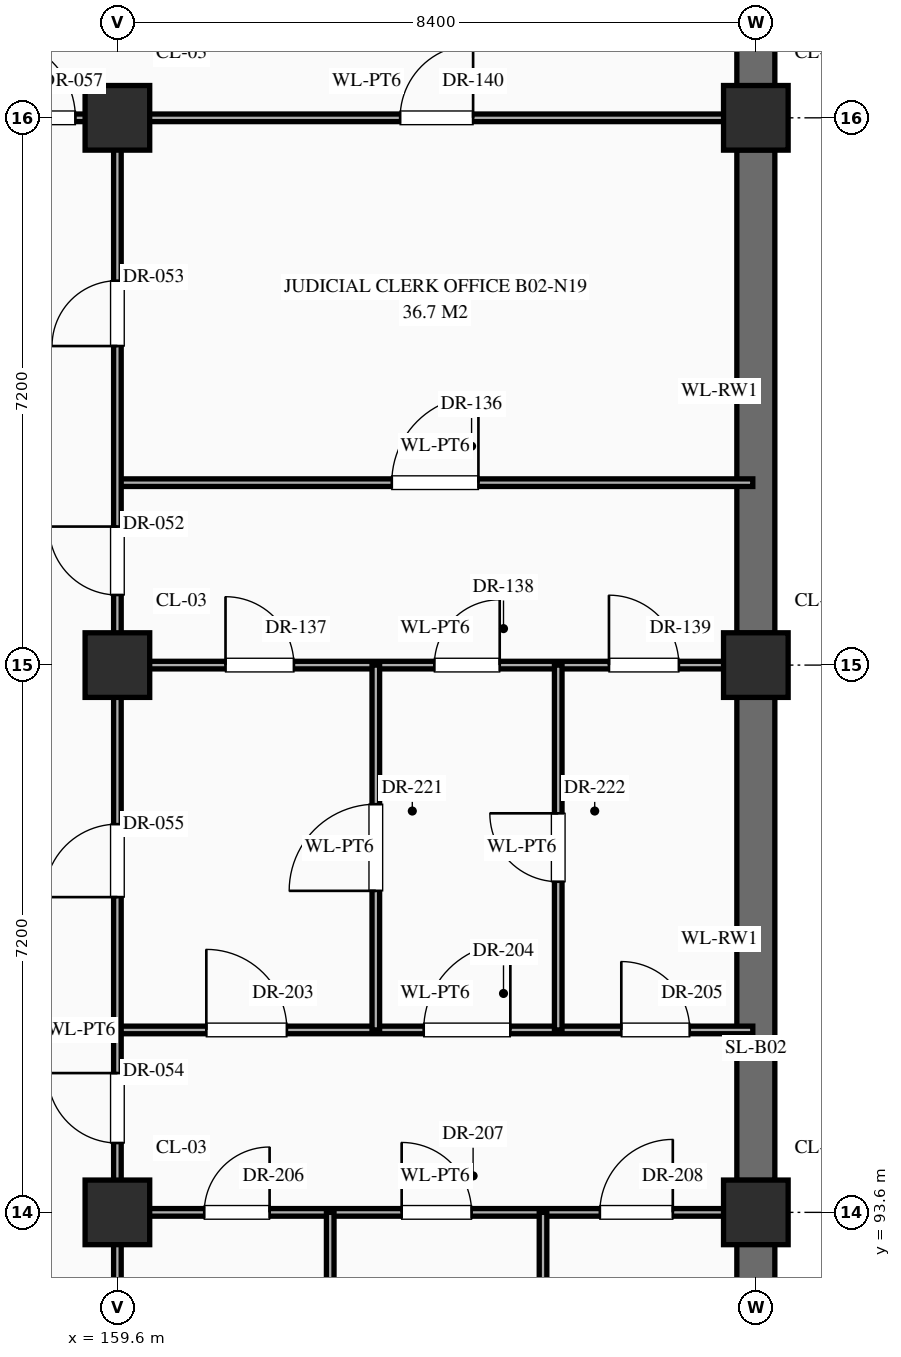
"""IFC4 building model, lengths in metres.
Left out: names, types, materials, properties, quantities, classifications, styles, units other than length and angle.
Written with IfcOpenShell. Run it as: python <this file> out.ifc"""

import sys

from ifc_helpers import new_model, si_unit, direction, frame, frame_2d, origin, origin_2d, place, context, subcontext, project, spatial, rectangle, extrude, element, fill, save


model = new_model("IFC4")
c1 = context("Model", 3, precision=1e-05, world=origin(), true_north=direction((0.0, 1.0)))
c2 = subcontext(c1, "Body", "Model", "MODEL_VIEW")
j1 = project(units=[si_unit("LENGTHUNIT", "METRE"), si_unit("PLANEANGLEUNIT", "RADIAN")], contexts=[c1])
p1 = place(None, origin())
s1 = spatial("IfcSite", under=j1, at=p1, CompositionType="ELEMENT")
p2 = place(p1, origin())
s2 = spatial("IfcBuilding", under=s1, at=p2, CompositionType="ELEMENT")
p3 = place(p2, frame((0.0, 0.0, -10.2)))
s3 = spatial("IfcBuildingStorey", under=s2, at=p3, CompositionType="ELEMENT", Elevation=-10.2)
for number, where, z_axis, x_axis in (
    (1, (159.6, 93.6, 0.0), (0.0, 0.0, 1.0), (1.0, 0.0, 0.0)),
    (2, (159.6, 100.8, 0.0), (0.0, 0.0, 1.0), (1.0, 0.0, 0.0)),
    (3, (159.6, 108.0, 0.0), (0.0, 0.0, 1.0), (1.0, 0.0, 0.0)),
    (4, (168.0, 93.6, 0.0), (0.0, 0.0, 1.0), (1.0, 0.0, 0.0)),
    (5, (168.0, 100.8, 0.0), (0.0, 0.0, 1.0), (1.0, 0.0, 0.0)),
    (6, (168.0, 108.0, 0.0), (0.0, 0.0, 1.0), (1.0, 0.0, 0.0)),
):
    element("IfcColumn", number, at=place(p3, frame(where, z_axis=z_axis, x_axis=x_axis)), inside=s3, PredefinedType="COLUMN", context=c2, shape_type="SweptSolid", body=[
        extrude(rectangle(XDim=0.85, YDim=0.85, at=origin_2d()), origin(), (0.0, 0.0, 1.0), 4.8),
    ])
for number, where, z_axis, x_axis in (
    (7, (168.0, 86.82, 0.0), (0.0, 0.0, 1.0), (0.0, 1.0, 0.0)),
    (8, (168.0, 94.02, 0.0), (0.0, 0.0, 1.0), (0.0, 1.0, 0.0)),
):
    element("IfcWall", number, at=place(p3, frame(where, z_axis=z_axis, x_axis=x_axis)), inside=s3, PredefinedType="USERDEFINED", context=c2, shape_type="SweptSolid", body=[
        extrude(rectangle(XDim=6.36, YDim=0.5, at=frame_2d((3.18, 0.0))), origin(), (0.0, 0.0, 1.0), 4.48),
    ])
for number, where, z_axis, x_axis in (
    (9, (168.0, 101.22, 0.0), (0.0, 0.0, 1.0), (0.0, 1.0, 0.0)),
    (10, (168.0, 108.42, 0.0), (0.0, 0.0, 1.0), (0.0, 1.0, 0.0)),
):
    element("IfcWall", number, at=place(p3, frame(where, z_axis=z_axis, x_axis=x_axis)), inside=s3, PredefinedType="USERDEFINED", context=c2, shape_type="SweptSolid", body=[
        extrude(rectangle(XDim=6.36, YDim=0.5, at=frame_2d((3.18, 0.0))), origin(), (0.0, 0.0, 1.0), 4.48),
    ])
p4 = place(p3, frame((159.6, 93.6, 0.0), z_axis=(0.0, 0.0, 1.0), x_axis=(1.0, 0.0, 0.0)))
e11 = element("IfcWall", 11, at=p4, inside=s3, PredefinedType="STANDARD", context=c2, shape_type="SweptSolid", body=[
    extrude(rectangle(XDim=8.36, YDim=0.1, at=frame_2d((4.18, 0.0))), origin(), (0.0, 0.0, 1.0), 3.63),
])
p5 = place(p4, frame((1.143, 0.0, 0.0)))
e12 = element("IfcOpeningElement", 12, at=p5, cuts=e11, PredefinedType="OPENING", context=c2, shape_type="SweptSolid", body=[
    extrude(rectangle(XDim=0.86, YDim=2.1, at=frame_2d((0.43, 1.05))), frame((0.0, 0.062, 0.0), z_axis=(0.0, -1.0, 0.0), x_axis=(1.0, 0.0, 0.0)), (0.0, 0.0, 1.0), 0.124),
])
p6 = place(p4, frame((3.74, 0.0, 0.0)))
e13 = element("IfcOpeningElement", 13, at=p6, cuts=e11, PredefinedType="OPENING", context=c2, shape_type="SweptSolid", body=[
    extrude(rectangle(XDim=0.92, YDim=2.15, at=frame_2d((0.46, 1.075))), frame((0.0, 0.062, 0.0), z_axis=(0.0, -1.0, 0.0), x_axis=(1.0, 0.0, 0.0)), (0.0, 0.0, 1.0), 0.124),
])
p7 = place(p4, frame((6.347, 0.0, 0.0)))
e14 = element("IfcOpeningElement", 14, at=p7, cuts=e11, PredefinedType="OPENING", context=c2, shape_type="SweptSolid", body=[
    extrude(rectangle(XDim=0.96, YDim=2.2, at=frame_2d((0.48, 1.1))), frame((0.0, 0.062, 0.0), z_axis=(0.0, -1.0, 0.0), x_axis=(1.0, 0.0, 0.0)), (0.0, 0.0, 1.0), 0.124),
])
p8 = place(p3, frame((159.6, 96.0, 0.0), z_axis=(0.0, 0.0, 1.0), x_axis=(1.0, 0.0, 0.0)))
e15 = element("IfcWall", 15, at=p8, inside=s3, PredefinedType="STANDARD", context=c2, shape_type="SweptSolid", body=[
    extrude(rectangle(XDim=8.36, YDim=0.1, at=frame_2d((4.18, 0.0))), origin(), (0.0, 0.0, 1.0), 4.48),
])
p9 = place(p8, frame((1.17, 0.0, 0.0)))
e16 = element("IfcOpeningElement", 16, at=p9, cuts=e15, PredefinedType="OPENING", context=c2, shape_type="SweptSolid", body=[
    extrude(rectangle(XDim=1.06, YDim=2.4, at=frame_2d((0.53, 1.2))), frame((0.0, 0.062, 0.0), z_axis=(0.0, -1.0, 0.0), x_axis=(1.0, 0.0, 0.0)), (0.0, 0.0, 1.0), 0.124),
])
p10 = place(p8, frame((4.03, 0.0, 0.0)))
e17 = element("IfcOpeningElement", 17, at=p10, cuts=e15, PredefinedType="OPENING", context=c2, shape_type="SweptSolid", body=[
    extrude(rectangle(XDim=1.14, YDim=2.4, at=frame_2d((0.57, 1.2))), frame((0.0, 0.062, 0.0), z_axis=(0.0, -1.0, 0.0), x_axis=(1.0, 0.0, 0.0)), (0.0, 0.0, 1.0), 0.124),
])
p11 = place(p8, frame((6.63, 0.0, 0.0)))
e18 = element("IfcOpeningElement", 18, at=p11, cuts=e15, PredefinedType="OPENING", context=c2, shape_type="SweptSolid", body=[
    extrude(rectangle(XDim=0.9, YDim=2.15, at=frame_2d((0.45, 1.075))), frame((0.0, 0.062, 0.0), z_axis=(0.0, -1.0, 0.0), x_axis=(1.0, 0.0, 0.0)), (0.0, 0.0, 1.0), 0.124),
])
p12 = place(p3, frame((159.6, 100.8, 0.0), z_axis=(0.0, 0.0, 1.0), x_axis=(1.0, 0.0, 0.0)))
e19 = element("IfcWall", 19, at=p12, inside=s3, PredefinedType="STANDARD", context=c2, shape_type="SweptSolid", body=[
    extrude(rectangle(XDim=8.36, YDim=0.1, at=frame_2d((4.18, 0.0))), origin(), (0.0, 0.0, 1.0), 3.63),
])
p13 = place(p12, frame((1.423, 0.0, 0.0)))
e20 = element("IfcOpeningElement", 20, at=p13, cuts=e19, PredefinedType="OPENING", context=c2, shape_type="SweptSolid", body=[
    extrude(rectangle(XDim=0.9, YDim=2.15, at=frame_2d((0.45, 1.075))), frame((0.0, 0.062, 0.0), z_axis=(0.0, -1.0, 0.0), x_axis=(1.0, 0.0, 0.0)), (0.0, 0.0, 1.0), 0.124),
])
p14 = place(p12, frame((4.17, 0.0, 0.0)))
e21 = element("IfcOpeningElement", 21, at=p14, cuts=e19, PredefinedType="OPENING", context=c2, shape_type="SweptSolid", body=[
    extrude(rectangle(XDim=0.86, YDim=2.1, at=frame_2d((0.43, 1.05))), frame((0.0, 0.062, 0.0), z_axis=(0.0, -1.0, 0.0), x_axis=(1.0, 0.0, 0.0)), (0.0, 0.0, 1.0), 0.124),
])
p15 = place(p12, frame((6.468, 0.0, 0.0)))
e22 = element("IfcOpeningElement", 22, at=p15, cuts=e19, PredefinedType="OPENING", context=c2, shape_type="SweptSolid", body=[
    extrude(rectangle(XDim=0.92, YDim=2.15, at=frame_2d((0.46, 1.075))), frame((0.0, 0.062, 0.0), z_axis=(0.0, -1.0, 0.0), x_axis=(1.0, 0.0, 0.0)), (0.0, 0.0, 1.0), 0.124),
])
p16 = place(p3, frame((159.6, 103.2, 0.0), z_axis=(0.0, 0.0, 1.0), x_axis=(1.0, 0.0, 0.0)))
e23 = element("IfcWall", 23, at=p16, inside=s3, PredefinedType="STANDARD", context=c2, shape_type="SweptSolid", body=[
    extrude(rectangle(XDim=8.36, YDim=0.1, at=frame_2d((4.18, 0.0))), origin(), (0.0, 0.0, 1.0), 4.48),
])
p17 = place(p16, frame((3.61, 0.0, 0.0)))
e24 = element("IfcOpeningElement", 24, at=p17, cuts=e23, PredefinedType="OPENING", context=c2, shape_type="SweptSolid", body=[
    extrude(rectangle(XDim=1.14, YDim=2.4, at=frame_2d((0.57, 1.2))), frame((0.0, 0.062, 0.0), z_axis=(0.0, -1.0, 0.0), x_axis=(1.0, 0.0, 0.0)), (0.0, 0.0, 1.0), 0.124),
])
p18 = place(p3, frame((157.8, 108.0, 0.0), z_axis=(0.0, 0.0, 1.0), x_axis=(1.0, 0.0, 0.0)))
e25 = element("IfcWall", 25, at=p18, inside=s3, PredefinedType="STANDARD", context=c2, shape_type="SweptSolid", body=[
    extrude(rectangle(XDim=10.16, YDim=0.1, at=frame_2d((5.08, 0.0))), origin(), (0.0, 0.0, 1.0), 3.63),
])
p19 = place(p18, frame((0.208, 0.0, 0.0)))
e26 = element("IfcOpeningElement", 26, at=p19, cuts=e25, PredefinedType="OPENING", context=c2, shape_type="SweptSolid", body=[
    extrude(rectangle(XDim=1.04, YDim=2.2, at=frame_2d((0.52, 1.1))), frame((0.0, 0.062, 0.0), z_axis=(0.0, -1.0, 0.0), x_axis=(1.0, 0.0, 0.0)), (0.0, 0.0, 1.0), 0.124),
])
p20 = place(p18, frame((5.52, 0.0, 0.0)))
e27 = element("IfcOpeningElement", 27, at=p20, cuts=e25, PredefinedType="OPENING", context=c2, shape_type="SweptSolid", body=[
    extrude(rectangle(XDim=0.96, YDim=2.2, at=frame_2d((0.48, 1.1))), frame((0.0, 0.062, 0.0), z_axis=(0.0, -1.0, 0.0), x_axis=(1.0, 0.0, 0.0)), (0.0, 0.0, 1.0), 0.124),
])
p21 = place(p3, frame((159.6, 84.0, 0.0), z_axis=(0.0, 0.0, 1.0), x_axis=(0.0, 1.0, 0.0)))
e28 = element("IfcWall", 28, at=p21, inside=s3, PredefinedType="STANDARD", context=c2, shape_type="SweptSolid", body=[
    extrude(rectangle(XDim=24.0, YDim=0.1, at=frame_2d((12.0, 0.0))), origin(), (0.0, 0.0, 1.0), 3.73),
])
p22 = place(p21, frame((17.722, 0.0, 0.0)))
e29 = element("IfcOpeningElement", 29, at=p22, cuts=e28, PredefinedType="OPENING", context=c2, shape_type="SweptSolid", body=[
    extrude(rectangle(XDim=0.9, YDim=2.15, at=frame_2d((0.45, 1.075))), frame((0.0, 0.062, 0.0), z_axis=(0.0, -1.0, 0.0), x_axis=(1.0, 0.0, 0.0)), (0.0, 0.0, 1.0), 0.124),
])
p23 = place(p21, frame((20.998, 0.0, 0.0)))
e30 = element("IfcOpeningElement", 30, at=p23, cuts=e28, PredefinedType="OPENING", context=c2, shape_type="SweptSolid", body=[
    extrude(rectangle(XDim=0.86, YDim=2.1, at=frame_2d((0.43, 1.05))), frame((0.0, 0.062, 0.0), z_axis=(0.0, -1.0, 0.0), x_axis=(1.0, 0.0, 0.0)), (0.0, 0.0, 1.0), 0.124),
])
p24 = place(p21, frame((10.512, 0.0, 0.0)))
e31 = element("IfcOpeningElement", 31, at=p24, cuts=e28, PredefinedType="OPENING", context=c2, shape_type="SweptSolid", body=[
    extrude(rectangle(XDim=0.92, YDim=2.15, at=frame_2d((0.46, 1.075))), frame((0.0, 0.062, 0.0), z_axis=(0.0, -1.0, 0.0), x_axis=(1.0, 0.0, 0.0)), (0.0, 0.0, 1.0), 0.124),
])
p25 = place(p21, frame((13.748, 0.0, 0.0)))
e32 = element("IfcOpeningElement", 32, at=p25, cuts=e28, PredefinedType="OPENING", context=c2, shape_type="SweptSolid", body=[
    extrude(rectangle(XDim=0.96, YDim=2.2, at=frame_2d((0.48, 1.1))), frame((0.0, 0.062, 0.0), z_axis=(0.0, -1.0, 0.0), x_axis=(1.0, 0.0, 0.0)), (0.0, 0.0, 1.0), 0.124),
])
p26 = place(p21, frame((5.5, 0.0, 0.0)))
e33 = element("IfcOpeningElement", 33, at=p26, cuts=e28, PredefinedType="OPENING", context=c2, shape_type="SweptSolid", body=[
    extrude(rectangle(XDim=1.0, YDim=2.25, at=frame_2d((0.5, 1.125))), frame((0.0, 0.062, 0.0), z_axis=(0.0, -1.0, 0.0), x_axis=(1.0, 0.0, 0.0)), (0.0, 0.0, 1.0), 0.124),
])
p27 = place(p21, frame((0.488, 0.0, 0.0)))
e34 = element("IfcOpeningElement", 34, at=p27, cuts=e28, PredefinedType="OPENING", context=c2, shape_type="SweptSolid", body=[
    extrude(rectangle(XDim=1.08, YDim=2.25, at=frame_2d((0.54, 1.125))), frame((0.0, 0.062, 0.0), z_axis=(0.0, -1.0, 0.0), x_axis=(1.0, 0.0, 0.0)), (0.0, 0.0, 1.0), 0.124),
])
p28 = place(p3, frame((162.4, 86.4, 0.0), z_axis=(0.0, 0.0, 1.0), x_axis=(0.0, 1.0, 0.0)))
e35 = element("IfcWall", 35, at=p28, inside=s3, PredefinedType="STANDARD", context=c2, shape_type="SweptSolid", body=[
    extrude(rectangle(XDim=7.2, YDim=0.1, at=frame_2d((3.6, 0.0))), origin(), (0.0, 0.0, 1.0), 4.48),
])
p29 = place(p28, frame((3.14, 0.0, 0.0)))
e36 = element("IfcOpeningElement", 36, at=p29, cuts=e35, PredefinedType="OPENING", context=c2, shape_type="SweptSolid", body=[
    extrude(rectangle(XDim=0.92, YDim=2.15, at=frame_2d((0.46, 1.075))), frame((0.0, 0.062, 0.0), z_axis=(0.0, -1.0, 0.0), x_axis=(1.0, 0.0, 0.0)), (0.0, 0.0, 1.0), 0.124),
])
p30 = place(p3, frame((163.0, 96.0, 0.0), z_axis=(0.0, 0.0, 1.0), x_axis=(0.0, 1.0, 0.0)))
e37 = element("IfcWall", 37, at=p30, inside=s3, PredefinedType="STANDARD", context=c2, shape_type="SweptSolid", body=[
    extrude(rectangle(XDim=4.8, YDim=0.1, at=frame_2d((2.4, 0.0))), origin(), (0.0, 0.0, 1.0), 4.48),
])
p31 = place(p30, frame((1.83, 0.0, 0.0)))
e38 = element("IfcOpeningElement", 38, at=p31, cuts=e37, PredefinedType="OPENING", context=c2, shape_type="SweptSolid", body=[
    extrude(rectangle(XDim=1.14, YDim=2.4, at=frame_2d((0.57, 1.2))), frame((0.0, 0.062, 0.0), z_axis=(0.0, -1.0, 0.0), x_axis=(1.0, 0.0, 0.0)), (0.0, 0.0, 1.0), 0.124),
])
p32 = place(p3, frame((165.2, 86.4, 0.0), z_axis=(0.0, 0.0, 1.0), x_axis=(0.0, 1.0, 0.0)))
e39 = element("IfcWall", 39, at=p32, inside=s3, PredefinedType="STANDARD", context=c2, shape_type="SweptSolid", body=[
    extrude(rectangle(XDim=7.2, YDim=0.1, at=frame_2d((3.6, 0.0))), origin(), (0.0, 0.0, 1.0), 4.48),
])
p33 = place(p32, frame((3.1, 0.0, 0.0)))
e40 = element("IfcOpeningElement", 40, at=p33, cuts=e39, PredefinedType="OPENING", context=c2, shape_type="SweptSolid", body=[
    extrude(rectangle(XDim=1.0, YDim=2.25, at=frame_2d((0.5, 1.125))), frame((0.0, 0.062, 0.0), z_axis=(0.0, -1.0, 0.0), x_axis=(1.0, 0.0, 0.0)), (0.0, 0.0, 1.0), 0.124),
])
p34 = place(p3, frame((165.4, 96.0, 0.0), z_axis=(0.0, 0.0, 1.0), x_axis=(0.0, 1.0, 0.0)))
e41 = element("IfcWall", 41, at=p34, inside=s3, PredefinedType="STANDARD", context=c2, shape_type="SweptSolid", body=[
    extrude(rectangle(XDim=4.8, YDim=0.1, at=frame_2d((2.4, 0.0))), origin(), (0.0, 0.0, 1.0), 4.48),
])
p35 = place(p34, frame((1.95, 0.0, 0.0)))
e42 = element("IfcOpeningElement", 42, at=p35, cuts=e41, PredefinedType="OPENING", context=c2, shape_type="SweptSolid", body=[
    extrude(rectangle(XDim=0.9, YDim=2.15, at=frame_2d((0.45, 1.075))), frame((0.0, 0.062, 0.0), z_axis=(0.0, -1.0, 0.0), x_axis=(1.0, 0.0, 0.0)), (0.0, 0.0, 1.0), 0.124),
])
p36 = place(p22, origin())
e43 = element("IfcDoor", 43, at=p36, inside=s3, OperationType="SINGLE_SWING_RIGHT", PredefinedType="DOOR", context=c2, shape_type="SweptSolid", body=[
    extrude(rectangle(XDim=0.9, YDim=2.15, at=frame_2d((0.45, 1.075))), frame((0.0, 0.025, 0.0), z_axis=(0.0, -1.0, 0.0), x_axis=(1.0, 0.0, 0.0)), (0.0, 0.0, 1.0), 0.05),
])
fill(e29, e43)
p37 = place(p23, origin())
e44 = element("IfcDoor", 44, at=p37, inside=s3, OperationType="SINGLE_SWING_LEFT", PredefinedType="DOOR", context=c2, shape_type="SweptSolid", body=[
    extrude(rectangle(XDim=0.86, YDim=2.1, at=frame_2d((0.43, 1.05))), frame((0.0, 0.025, 0.0), z_axis=(0.0, -1.0, 0.0), x_axis=(1.0, 0.0, 0.0)), (0.0, 0.0, 1.0), 0.05),
])
fill(e30, e44)
p38 = place(p24, origin())
e45 = element("IfcDoor", 45, at=p38, inside=s3, OperationType="SINGLE_SWING_RIGHT", PredefinedType="DOOR", context=c2, shape_type="SweptSolid", body=[
    extrude(rectangle(XDim=0.92, YDim=2.15, at=frame_2d((0.46, 1.075))), frame((0.0, 0.025, 0.0), z_axis=(0.0, -1.0, 0.0), x_axis=(1.0, 0.0, 0.0)), (0.0, 0.0, 1.0), 0.05),
])
fill(e31, e45)
p39 = place(p25, origin())
e46 = element("IfcDoor", 46, at=p39, inside=s3, OperationType="SINGLE_SWING_LEFT", PredefinedType="DOOR", context=c2, shape_type="SweptSolid", body=[
    extrude(rectangle(XDim=0.96, YDim=2.2, at=frame_2d((0.48, 1.1))), frame((0.0, 0.025, 0.0), z_axis=(0.0, -1.0, 0.0), x_axis=(1.0, 0.0, 0.0)), (0.0, 0.0, 1.0), 0.05),
])
fill(e32, e46)
p40 = place(p19, origin())
e47 = element("IfcDoor", 47, at=p40, inside=s3, OperationType="SINGLE_SWING_LEFT", PredefinedType="DOOR", context=c2, shape_type="SweptSolid", body=[
    extrude(rectangle(XDim=1.04, YDim=2.2, at=frame_2d((0.52, 1.1))), frame((0.0, 0.025, 0.0), z_axis=(0.0, -1.0, 0.0), x_axis=(1.0, 0.0, 0.0)), (0.0, 0.0, 1.0), 0.05),
])
fill(e26, e47)
p41 = place(p17, origin())
e48 = element("IfcDoor", 48, at=p41, inside=s3, OperationType="SINGLE_SWING_RIGHT", PredefinedType="DOOR", context=c2, shape_type="SweptSolid", body=[
    extrude(rectangle(XDim=1.14, YDim=2.4, at=frame_2d((0.57, 1.2))), frame((0.0, 0.025, 0.0), z_axis=(0.0, -1.0, 0.0), x_axis=(1.0, 0.0, 0.0)), (0.0, 0.0, 1.0), 0.05),
])
fill(e24, e48)
p42 = place(p13, origin())
e49 = element("IfcDoor", 49, at=p42, inside=s3, OperationType="SINGLE_SWING_LEFT", PredefinedType="DOOR", context=c2, shape_type="SweptSolid", body=[
    extrude(rectangle(XDim=0.9, YDim=2.15, at=frame_2d((0.45, 1.075))), frame((0.0, 0.025, 0.0), z_axis=(0.0, -1.0, 0.0), x_axis=(1.0, 0.0, 0.0)), (0.0, 0.0, 1.0), 0.05),
])
fill(e20, e49)
p43 = place(p14, origin())
e50 = element("IfcDoor", 50, at=p43, inside=s3, OperationType="SINGLE_SWING_RIGHT", PredefinedType="DOOR", context=c2, shape_type="SweptSolid", body=[
    extrude(rectangle(XDim=0.86, YDim=2.1, at=frame_2d((0.43, 1.05))), frame((0.0, 0.025, 0.0), z_axis=(0.0, -1.0, 0.0), x_axis=(1.0, 0.0, 0.0)), (0.0, 0.0, 1.0), 0.05),
])
fill(e21, e50)
p44 = place(p15, origin())
e51 = element("IfcDoor", 51, at=p44, inside=s3, OperationType="SINGLE_SWING_LEFT", PredefinedType="DOOR", context=c2, shape_type="SweptSolid", body=[
    extrude(rectangle(XDim=0.92, YDim=2.15, at=frame_2d((0.46, 1.075))), frame((0.0, 0.025, 0.0), z_axis=(0.0, -1.0, 0.0), x_axis=(1.0, 0.0, 0.0)), (0.0, 0.0, 1.0), 0.05),
])
fill(e22, e51)
p45 = place(p20, origin())
e52 = element("IfcDoor", 52, at=p45, inside=s3, OperationType="SINGLE_SWING_RIGHT", PredefinedType="DOOR", context=c2, shape_type="SweptSolid", body=[
    extrude(rectangle(XDim=0.96, YDim=2.2, at=frame_2d((0.48, 1.1))), frame((0.0, 0.025, 0.0), z_axis=(0.0, -1.0, 0.0), x_axis=(1.0, 0.0, 0.0)), (0.0, 0.0, 1.0), 0.05),
])
fill(e27, e52)
p46 = place(p9, origin())
e53 = element("IfcDoor", 53, at=p46, inside=s3, OperationType="SINGLE_SWING_LEFT", PredefinedType="DOOR", context=c2, shape_type="SweptSolid", body=[
    extrude(rectangle(XDim=1.06, YDim=2.4, at=frame_2d((0.53, 1.2))), frame((0.0, 0.025, 0.0), z_axis=(0.0, -1.0, 0.0), x_axis=(1.0, 0.0, 0.0)), (0.0, 0.0, 1.0), 0.05),
])
fill(e16, e53)
p47 = place(p10, origin())
e54 = element("IfcDoor", 54, at=p47, inside=s3, OperationType="SINGLE_SWING_RIGHT", PredefinedType="DOOR", context=c2, shape_type="SweptSolid", body=[
    extrude(rectangle(XDim=1.14, YDim=2.4, at=frame_2d((0.57, 1.2))), frame((0.0, 0.025, 0.0), z_axis=(0.0, -1.0, 0.0), x_axis=(1.0, 0.0, 0.0)), (0.0, 0.0, 1.0), 0.05),
])
fill(e17, e54)
p48 = place(p11, origin())
e55 = element("IfcDoor", 55, at=p48, inside=s3, OperationType="SINGLE_SWING_LEFT", PredefinedType="DOOR", context=c2, shape_type="SweptSolid", body=[
    extrude(rectangle(XDim=0.9, YDim=2.15, at=frame_2d((0.45, 1.075))), frame((0.0, 0.025, 0.0), z_axis=(0.0, -1.0, 0.0), x_axis=(1.0, 0.0, 0.0)), (0.0, 0.0, 1.0), 0.05),
])
fill(e18, e55)
p49 = place(p5, origin())
e56 = element("IfcDoor", 56, at=p49, inside=s3, OperationType="SINGLE_SWING_RIGHT", PredefinedType="DOOR", context=c2, shape_type="SweptSolid", body=[
    extrude(rectangle(XDim=0.86, YDim=2.1, at=frame_2d((0.43, 1.05))), frame((0.0, 0.025, 0.0), z_axis=(0.0, -1.0, 0.0), x_axis=(1.0, 0.0, 0.0)), (0.0, 0.0, 1.0), 0.05),
])
fill(e12, e56)
p50 = place(p6, origin())
e57 = element("IfcDoor", 57, at=p50, inside=s3, OperationType="SINGLE_SWING_LEFT", PredefinedType="DOOR", context=c2, shape_type="SweptSolid", body=[
    extrude(rectangle(XDim=0.92, YDim=2.15, at=frame_2d((0.46, 1.075))), frame((0.0, 0.025, 0.0), z_axis=(0.0, -1.0, 0.0), x_axis=(1.0, 0.0, 0.0)), (0.0, 0.0, 1.0), 0.05),
])
fill(e13, e57)
p51 = place(p7, origin())
e58 = element("IfcDoor", 58, at=p51, inside=s3, OperationType="SINGLE_SWING_RIGHT", PredefinedType="DOOR", context=c2, shape_type="SweptSolid", body=[
    extrude(rectangle(XDim=0.96, YDim=2.2, at=frame_2d((0.48, 1.1))), frame((0.0, 0.025, 0.0), z_axis=(0.0, -1.0, 0.0), x_axis=(1.0, 0.0, 0.0)), (0.0, 0.0, 1.0), 0.05),
])
fill(e14, e58)
p52 = place(p31, origin())
e59 = element("IfcDoor", 59, at=p52, inside=s3, OperationType="SINGLE_SWING_LEFT", PredefinedType="DOOR", context=c2, shape_type="SweptSolid", body=[
    extrude(rectangle(XDim=1.14, YDim=2.4, at=frame_2d((0.57, 1.2))), frame((0.0, 0.025, 0.0), z_axis=(0.0, -1.0, 0.0), x_axis=(1.0, 0.0, 0.0)), (0.0, 0.0, 1.0), 0.05),
])
fill(e38, e59)
p53 = place(p35, origin())
e60 = element("IfcDoor", 60, at=p53, inside=s3, OperationType="SINGLE_SWING_RIGHT", PredefinedType="DOOR", context=c2, shape_type="SweptSolid", body=[
    extrude(rectangle(XDim=0.9, YDim=2.15, at=frame_2d((0.45, 1.075))), frame((0.0, 0.025, 0.0), z_axis=(0.0, -1.0, 0.0), x_axis=(1.0, 0.0, 0.0)), (0.0, 0.0, 1.0), 0.05),
])
fill(e42, e60)
save(model, sys.argv[1])
